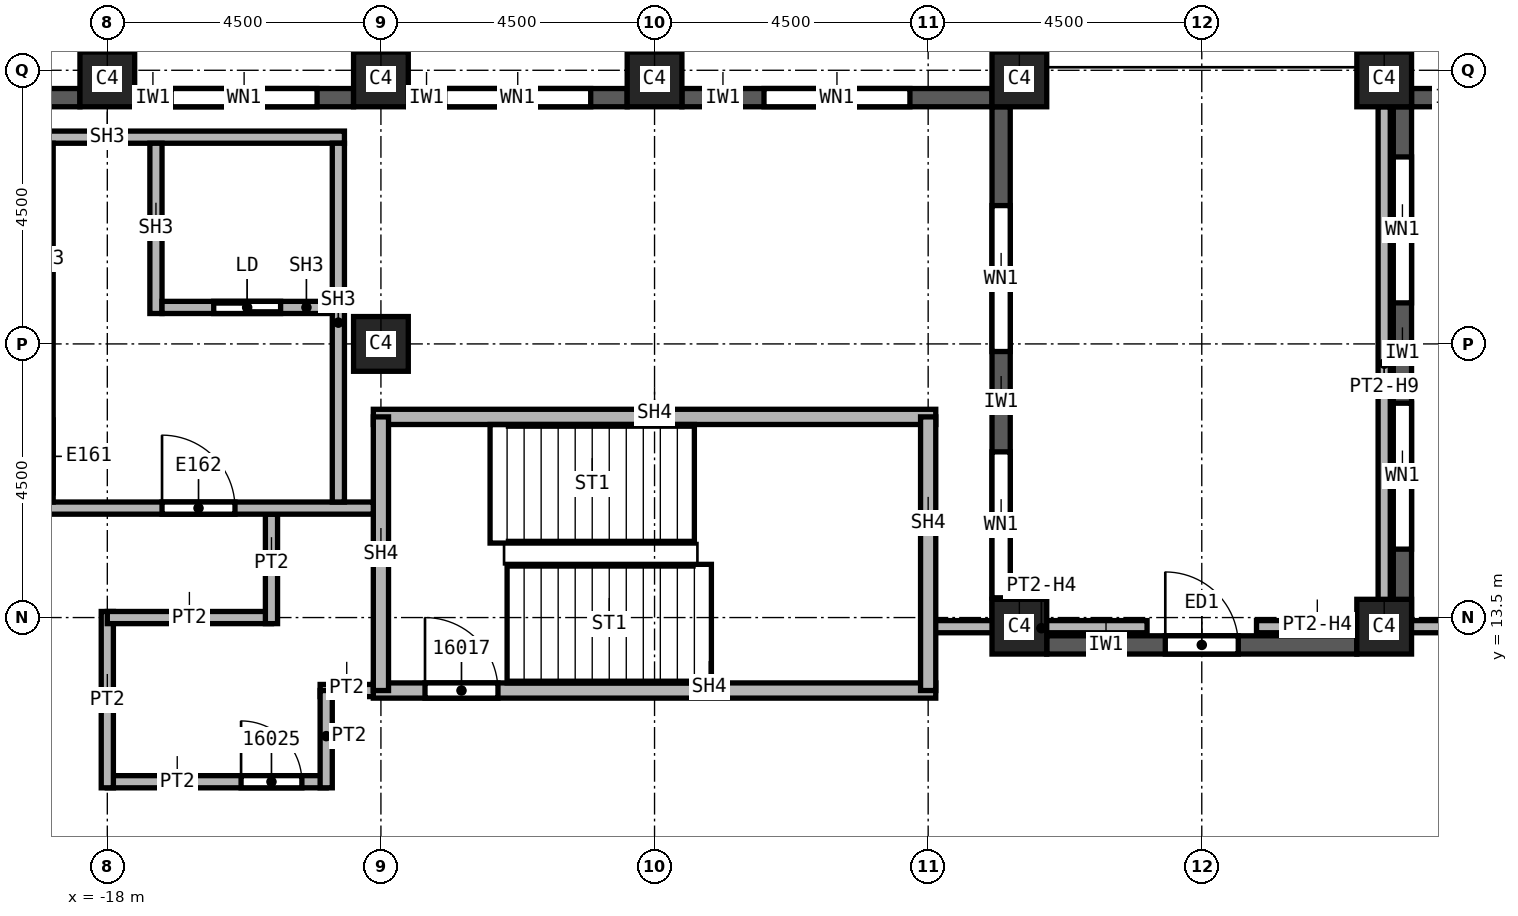
"""IFC4 building model, lengths in metres.
Left out: names, types, materials, properties, quantities, classifications, styles, units other than length and angle.
Written with IfcOpenShell. Run it as: python <this file> out.ifc"""

import sys

from ifc_helpers import new_model, si_unit, direction, frame, frame_2d, origin, origin_2d, place, context, subcontext, project, spatial, rectangle, extrude, element, fill, save


model = new_model("IFC4")
c1 = context("Model", 3, precision=1e-05, world=origin(), true_north=direction((0.0, 1.0)))
c2 = subcontext(c1, "Body", "Model", "MODEL_VIEW")
j1 = project(units=[si_unit("LENGTHUNIT", "METRE"), si_unit("PLANEANGLEUNIT", "RADIAN")], contexts=[c1])
p1 = place(None, origin())
s1 = spatial("IfcSite", under=j1, at=p1, CompositionType="ELEMENT")
p2 = place(p1, origin())
s2 = spatial("IfcBuilding", under=s1, at=p2, CompositionType="ELEMENT")
p3 = place(p2, frame((0.0, 0.0, 242.0)))
s3 = spatial("IfcBuildingStorey", under=s2, at=p3, CompositionType="ELEMENT", Elevation=242.0)
for number, where, z_axis, x_axis in (
    (1, (-13.5, 18.0, 0.0), (0.0, 0.0, 1.0), (1.0, 0.0, 0.0)),
    (2, (3.0, 22.35, 0.0), (0.0, 0.0, 1.0), (1.0, 0.0, 0.0)),
    (3, (-3.0, 22.35, 0.0), (0.0, 0.0, 1.0), (1.0, 0.0, 0.0)),
    (4, (-9.0, 22.35, 0.0), (0.0, 0.0, 1.0), (1.0, 0.0, 0.0)),
    (5, (-13.5, 22.35, 0.0), (0.0, 0.0, 1.0), (1.0, 0.0, 0.0)),
    (6, (-18.0, 22.35, 0.0), (0.0, 0.0, 1.0), (1.0, 0.0, 0.0)),
    (7, (3.0, 13.35, 0.0), (0.0, 0.0, 1.0), (1.0, 0.0, 0.0)),
    (8, (-3.0, 13.35, 0.0), (0.0, 0.0, 1.0), (1.0, 0.0, 0.0)),
):
    element("IfcColumn", number, at=place(p3, frame(where, z_axis=z_axis, x_axis=x_axis)), inside=s3, PredefinedType="COLUMN", context=c2, shape_type="SweptSolid", body=[
        extrude(rectangle(XDim=0.9, YDim=0.9, at=origin_2d()), origin(), (0.0, 0.0, 1.0), 3.72),
    ])
p4 = place(p3, frame((8.55, 22.05, 0.0), z_axis=(0.0, 0.0, 1.0), x_axis=(-1.0, 0.0, 0.0)))
e9 = element("IfcWall", 9, at=p4, inside=s3, PredefinedType="SOLIDWALL", context=c2, shape_type="SweptSolid", body=[
    extrude(rectangle(XDim=5.1, YDim=0.3, at=frame_2d((2.55, 0.0))), origin(), (0.0, 0.0, 1.0), 3.12),
])
p5 = place(p4, frame((1.35, 0.0, 0.8)))
e10 = element("IfcOpeningElement", 10, at=p5, cuts=e9, PredefinedType="OPENING", context=c2, shape_type="SweptSolid", body=[
    extrude(rectangle(XDim=2.4, YDim=1.95, at=frame_2d((1.2, 0.975))), frame((0.0, 0.15, 0.0), z_axis=(0.0, -1.0, 0.0), x_axis=(1.0, 0.0, 0.0)), (0.0, 0.0, 1.0), 0.3),
])
p6 = place(p3, frame((3.3, 21.9, 0.0), z_axis=(0.0, 0.0, 1.0), x_axis=(0.0, -1.0, 0.0)))
e11 = element("IfcWall", 11, at=p6, inside=s3, PredefinedType="SOLIDWALL", context=c2, shape_type="SweptSolid", body=[
    extrude(rectangle(XDim=8.5, YDim=0.3, at=frame_2d((4.25, 0.0))), origin(), (0.0, 0.0, 1.0), 3.12),
])
p7 = place(p6, frame((0.825, 0.0, 0.8)))
e12 = element("IfcOpeningElement", 12, at=p7, cuts=e11, PredefinedType="OPENING", context=c2, shape_type="SweptSolid", body=[
    extrude(rectangle(XDim=2.4, YDim=1.95, at=frame_2d((1.2, 0.975))), frame((0.0, 0.15, 0.0), z_axis=(0.0, -1.0, 0.0), x_axis=(1.0, 0.0, 0.0)), (0.0, 0.0, 1.0), 0.3),
])
p8 = place(p6, frame((4.875, 0.0, 0.8)))
e13 = element("IfcOpeningElement", 13, at=p8, cuts=e11, PredefinedType="OPENING", context=c2, shape_type="SweptSolid", body=[
    extrude(rectangle(XDim=2.4, YDim=1.95, at=frame_2d((1.2, 0.975))), frame((0.0, 0.15, 0.0), z_axis=(0.0, -1.0, 0.0), x_axis=(1.0, 0.0, 0.0)), (0.0, 0.0, 1.0), 0.3),
])
p9 = place(p3, frame((-2.55, 13.05, 0.0), z_axis=(0.0, 0.0, 1.0), x_axis=(1.0, 0.0, 0.0)))
e14 = element("IfcWall", 14, at=p9, inside=s3, PredefinedType="SOLIDWALL", context=c2, shape_type="SweptSolid", body=[
    extrude(rectangle(XDim=5.1, YDim=0.3, at=frame_2d((2.55, 0.0))), origin(), (0.0, 0.0, 1.0), 3.12),
])
p10 = place(p9, frame((1.95, 0.0, 0.0)))
e15 = element("IfcOpeningElement", 15, at=p10, cuts=e14, PredefinedType="OPENING", context=c2, shape_type="SweptSolid", body=[
    extrude(rectangle(XDim=1.2, YDim=2.4, at=frame_2d((0.6, 1.2))), frame((0.0, 0.15, 0.0), z_axis=(0.0, -1.0, 0.0), x_axis=(1.0, 0.0, 0.0)), (0.0, 0.0, 1.0), 0.3),
])
p11 = place(p3, frame((-3.3, 13.4, 0.0), z_axis=(0.0, 0.0, 1.0), x_axis=(0.0, 1.0, 0.0)))
e16 = element("IfcWall", 16, at=p11, inside=s3, PredefinedType="SOLIDWALL", context=c2, shape_type="SweptSolid", body=[
    extrude(rectangle(XDim=8.5, YDim=0.3, at=frame_2d((4.25, 0.0))), origin(), (0.0, 0.0, 1.0), 3.12),
])
p12 = place(p11, frame((0.425, 0.0, 0.8)))
e17 = element("IfcOpeningElement", 17, at=p12, cuts=e16, PredefinedType="OPENING", context=c2, shape_type="SweptSolid", body=[
    extrude(rectangle(XDim=2.4, YDim=1.95, at=frame_2d((1.2, 0.975))), frame((0.0, 0.15, 0.0), z_axis=(0.0, -1.0, 0.0), x_axis=(1.0, 0.0, 0.0)), (0.0, 0.0, 1.0), 0.3),
])
p13 = place(p11, frame((4.475, 0.0, 0.8)))
e18 = element("IfcOpeningElement", 18, at=p13, cuts=e16, PredefinedType="OPENING", context=c2, shape_type="SweptSolid", body=[
    extrude(rectangle(XDim=2.4, YDim=1.95, at=frame_2d((1.2, 0.975))), frame((0.0, 0.15, 0.0), z_axis=(0.0, -1.0, 0.0), x_axis=(1.0, 0.0, 0.0)), (0.0, 0.0, 1.0), 0.3),
])
p14 = place(p3, frame((-3.45, 22.05, 0.0), z_axis=(0.0, 0.0, 1.0), x_axis=(-1.0, 0.0, 0.0)))
e19 = element("IfcWall", 19, at=p14, inside=s3, PredefinedType="SOLIDWALL", context=c2, shape_type="SweptSolid", body=[
    extrude(rectangle(XDim=5.1, YDim=0.3, at=frame_2d((2.55, 0.0))), origin(), (0.0, 0.0, 1.0), 3.12),
])
p15 = place(p14, frame((1.35, 0.0, 0.8)))
e20 = element("IfcOpeningElement", 20, at=p15, cuts=e19, PredefinedType="OPENING", context=c2, shape_type="SweptSolid", body=[
    extrude(rectangle(XDim=2.4, YDim=1.95, at=frame_2d((1.2, 0.975))), frame((0.0, 0.15, 0.0), z_axis=(0.0, -1.0, 0.0), x_axis=(1.0, 0.0, 0.0)), (0.0, 0.0, 1.0), 0.3),
])
p16 = place(p3, frame((-9.45, 22.05, 0.0), z_axis=(0.0, 0.0, 1.0), x_axis=(-1.0, 0.0, 0.0)))
e21 = element("IfcWall", 21, at=p16, inside=s3, PredefinedType="SOLIDWALL", context=c2, shape_type="SweptSolid", body=[
    extrude(rectangle(XDim=3.6, YDim=0.3, at=frame_2d((1.8, 0.0))), origin(), (0.0, 0.0, 1.0), 3.12),
])
p17 = place(p16, frame((0.6, 0.0, 0.8)))
e22 = element("IfcOpeningElement", 22, at=p17, cuts=e21, PredefinedType="OPENING", context=c2, shape_type="SweptSolid", body=[
    extrude(rectangle(XDim=2.4, YDim=1.95, at=frame_2d((1.2, 0.975))), frame((0.0, 0.15, 0.0), z_axis=(0.0, -1.0, 0.0), x_axis=(1.0, 0.0, 0.0)), (0.0, 0.0, 1.0), 0.3),
])
p18 = place(p3, frame((-13.95, 22.05, 0.0), z_axis=(0.0, 0.0, 1.0), x_axis=(-1.0, 0.0, 0.0)))
e23 = element("IfcWall", 23, at=p18, inside=s3, PredefinedType="SOLIDWALL", context=c2, shape_type="SweptSolid", body=[
    extrude(rectangle(XDim=3.6, YDim=0.3, at=frame_2d((1.8, 0.0))), origin(), (0.0, 0.0, 1.0), 3.12),
])
p19 = place(p18, frame((0.6, 0.0, 0.8)))
e24 = element("IfcOpeningElement", 24, at=p19, cuts=e23, PredefinedType="OPENING", context=c2, shape_type="SweptSolid", body=[
    extrude(rectangle(XDim=2.4, YDim=1.95, at=frame_2d((1.2, 0.975))), frame((0.0, 0.15, 0.0), z_axis=(0.0, -1.0, 0.0), x_axis=(1.0, 0.0, 0.0)), (0.0, 0.0, 1.0), 0.3),
])
p20 = place(p3, frame((-18.45, 22.05, 0.0), z_axis=(0.0, 0.0, 1.0), x_axis=(-1.0, 0.0, 0.0)))
e25 = element("IfcWall", 25, at=p20, inside=s3, PredefinedType="SOLIDWALL", context=c2, shape_type="SweptSolid", body=[
    extrude(rectangle(XDim=3.6, YDim=0.3, at=frame_2d((1.8, 0.0))), origin(), (0.0, 0.0, 1.0), 3.12),
])
p21 = place(p20, frame((0.6, 0.0, 0.8)))
e26 = element("IfcOpeningElement", 26, at=p21, cuts=e25, PredefinedType="OPENING", context=c2, shape_type="SweptSolid", body=[
    extrude(rectangle(XDim=2.4, YDim=1.95, at=frame_2d((1.2, 0.975))), frame((0.0, 0.15, 0.0), z_axis=(0.0, -1.0, 0.0), x_axis=(1.0, 0.0, 0.0)), (0.0, 0.0, 1.0), 0.3),
])
p22 = place(p3, frame((-18.0, 10.8, 0.0), z_axis=(0.0, 0.0, 1.0), x_axis=(1.0, 0.0, 0.0)))
e27 = element("IfcWall", 27, at=p22, inside=s3, PredefinedType="PARTITIONING", context=c2, shape_type="SweptSolid", body=[
    extrude(rectangle(XDim=3.6, YDim=0.2, at=frame_2d((1.8, 0.0))), origin(), (0.0, 0.0, 1.0), 3.72),
])
p23 = place(p22, frame((2.2, 0.0, 0.0)))
e28 = element("IfcOpeningElement", 28, at=p23, cuts=e27, PredefinedType="OPENING", context=c2, shape_type="SweptSolid", body=[
    extrude(rectangle(XDim=1.0, YDim=2.1, at=frame_2d((0.5, 1.05))), frame((0.0, 0.1, 0.0), z_axis=(0.0, -1.0, 0.0), x_axis=(1.0, 0.0, 0.0)), (0.0, 0.0, 1.0), 0.2),
])
p24 = place(p3, frame((-18.0, 13.6, 0.0), z_axis=(0.0, 0.0, 1.0), x_axis=(0.0, -1.0, 0.0)))
e29 = element("IfcWall", 29, at=p24, inside=s3, PredefinedType="PARTITIONING", context=c2, shape_type="SweptSolid", body=[
    extrude(rectangle(XDim=2.9, YDim=0.2, at=frame_2d((1.45, 0.0))), origin(), (0.0, 0.0, 1.0), 3.72),
])
p25 = place(p3, frame((-15.3, 13.5, 0.0), z_axis=(0.0, 0.0, 1.0), x_axis=(-1.0, 0.0, 0.0)))
e30 = element("IfcWall", 30, at=p25, inside=s3, PredefinedType="PARTITIONING", context=c2, shape_type="SweptSolid", body=[
    extrude(rectangle(XDim=2.7, YDim=0.2, at=frame_2d((1.35, 0.0))), origin(), (0.0, 0.0, 1.0), 3.72),
])
p26 = place(p3, frame((-15.3, 15.2, 0.0), z_axis=(0.0, 0.0, 1.0), x_axis=(0.0, -1.0, 0.0)))
e31 = element("IfcWall", 31, at=p26, inside=s3, PredefinedType="PARTITIONING", context=c2, shape_type="SweptSolid", body=[
    extrude(rectangle(XDim=1.8, YDim=0.2, at=frame_2d((0.9, 0.0))), origin(), (0.0, 0.0, 1.0), 3.72),
])
p27 = place(p3, frame((-14.5, 12.3, 0.0), z_axis=(0.0, 0.0, 1.0), x_axis=(1.0, 0.0, 0.0)))
e32 = element("IfcWall", 32, at=p27, inside=s3, PredefinedType="PARTITIONING", context=c2, shape_type="SweptSolid", body=[
    extrude(rectangle(XDim=1.125, YDim=0.2, at=frame_2d((0.562, 0.0))), origin(), (0.0, 0.0, 1.0), 3.72),
])
p28 = place(p3, frame((-14.4, 10.7, 0.0), z_axis=(0.0, 0.0, 1.0), x_axis=(0.0, 1.0, 0.0)))
e33 = element("IfcWall", 33, at=p28, inside=s3, PredefinedType="PARTITIONING", context=c2, shape_type="SweptSolid", body=[
    extrude(rectangle(XDim=1.6, YDim=0.2, at=frame_2d((0.8, 0.0))), origin(), (0.0, 0.0, 1.0), 3.72),
])
for number, where, z_axis, x_axis in (
    (34, (-4.5, 13.35, 0.0), (0.0, 0.0, 1.0), (1.0, 0.0, 0.0)),
    (35, (0.9, 13.35, 0.0), (0.0, 0.0, 1.0), (1.0, 0.0, 0.0)),
):
    element("IfcWall", number, at=place(p3, frame(where, z_axis=z_axis, x_axis=x_axis)), inside=s3, PredefinedType="PARTITIONING", context=c2, shape_type="SweptSolid", body=[
        extrude(rectangle(XDim=3.6, YDim=0.2, at=frame_2d((1.8, 0.0))), origin(), (0.0, 0.0, 1.0), 3.118),
    ])
p29 = place(p3, frame((3.0, 21.9, 0.0), z_axis=(0.0, 0.0, 1.0), x_axis=(0.0, -1.0, 0.0)))
e36 = element("IfcWall", 36, at=p29, inside=s3, PredefinedType="PARTITIONING", context=c2, shape_type="SweptSolid", body=[
    extrude(rectangle(XDim=8.55, YDim=0.2, at=frame_2d((4.275, 0.0))), origin(), (0.0, 0.0, 1.0), 2.874),
])
p30 = place(p3, frame((-13.625, 12.3, 0.0), z_axis=(0.0, 0.0, 1.0), x_axis=(1.0, 0.0, 0.0)))
e37 = element("IfcWall", 37, at=p30, inside=s3, PredefinedType="SOLIDWALL", context=c2, shape_type="SweptSolid", body=[
    extrude(rectangle(XDim=9.25, YDim=0.25, at=frame_2d((4.625, 0.0))), origin(), (0.0, 0.0, 1.0), 3.72),
])
p31 = place(p30, frame((0.85, 0.0, 0.0)))
e38 = element("IfcOpeningElement", 38, at=p31, cuts=e37, PredefinedType="OPENING", context=c2, shape_type="SweptSolid", body=[
    extrude(rectangle(XDim=1.2, YDim=2.1, at=frame_2d((0.6, 1.05))), frame((0.0, 0.125, 0.0), z_axis=(0.0, -1.0, 0.0), x_axis=(1.0, 0.0, 0.0)), (0.0, 0.0, 1.0), 0.25),
])
p32 = place(p3, frame((-13.625, 16.8, 0.0), z_axis=(0.0, 0.0, 1.0), x_axis=(1.0, 0.0, 0.0)))
e39 = element("IfcWall", 39, at=p32, inside=s3, PredefinedType="SOLIDWALL", context=c2, shape_type="SweptSolid", body=[
    extrude(rectangle(XDim=9.25, YDim=0.25, at=frame_2d((4.625, 0.0))), origin(), (0.0, 0.0, 1.0), 3.72),
])
for number, where, z_axis, x_axis in (
    (40, (-13.5, 12.3, 0.0), (0.0, 0.0, 1.0), (0.0, 1.0, 0.0)),
    (41, (-4.5, 16.8, 0.0), (0.0, 0.0, 1.0), (0.0, -1.0, 0.0)),
):
    element("IfcWall", number, at=place(p3, frame(where, z_axis=z_axis, x_axis=x_axis)), inside=s3, PredefinedType="SOLIDWALL", context=c2, shape_type="SweptSolid", body=[
        extrude(rectangle(XDim=4.5, YDim=0.25, at=frame_2d((2.25, 0.0))), origin(), (0.0, 0.0, 1.0), 3.72),
    ])
p33 = place(p3, frame((-21.9, 15.3, 0.0), z_axis=(0.0, 0.0, 1.0), x_axis=(1.0, 0.0, 0.0)))
e42 = element("IfcWall", 42, at=p33, inside=s3, PredefinedType="SOLIDWALL", context=c2, shape_type="SweptSolid", body=[
    extrude(rectangle(XDim=8.275, YDim=0.2, at=frame_2d((4.137, 0.0))), origin(), (0.0, 0.0, 1.0), 3.72),
])
p34 = place(p33, frame((4.8, 0.0, 0.0)))
e43 = element("IfcOpeningElement", 43, at=p34, cuts=e42, PredefinedType="OPENING", context=c2, shape_type="SweptSolid", body=[
    extrude(rectangle(XDim=1.2, YDim=2.1, at=frame_2d((0.6, 1.05))), frame((0.0, 0.1, 0.0), z_axis=(0.0, -1.0, 0.0), x_axis=(1.0, 0.0, 0.0)), (0.0, 0.0, 1.0), 0.2),
])
p35 = place(p3, frame((-21.9, 21.4, 0.0), z_axis=(0.0, 0.0, 1.0), x_axis=(1.0, 0.0, 0.0)))
e44 = element("IfcWall", 44, at=p35, inside=s3, PredefinedType="SOLIDWALL", context=c2, shape_type="SweptSolid", body=[
    extrude(rectangle(XDim=7.8, YDim=0.2, at=frame_2d((3.9, 0.0))), origin(), (0.0, 0.0, 1.0), 3.72),
])
p36 = place(p3, frame((-14.2, 15.4, 0.0), z_axis=(0.0, 0.0, 1.0), x_axis=(0.0, 1.0, 0.0)))
e45 = element("IfcWall", 45, at=p36, inside=s3, PredefinedType="SOLIDWALL", context=c2, shape_type="SweptSolid", body=[
    extrude(rectangle(XDim=5.9, YDim=0.2, at=frame_2d((2.95, 0.0))), origin(), (0.0, 0.0, 1.0), 3.72),
])
p37 = place(p3, frame((-18.99, 15.4, 0.0), z_axis=(0.0, 0.0, 1.0), x_axis=(0.0, 1.0, 0.0)))
e46 = element("IfcWall", 46, at=p37, inside=s3, PredefinedType="SOLIDWALL", context=c2, shape_type="SweptSolid", body=[
    extrude(rectangle(XDim=5.9, YDim=0.2, at=frame_2d((2.95, 0.0))), origin(), (0.0, 0.0, 1.0), 3.72),
])
p38 = place(p37, frame((0.15, 0.0, 0.0)))
e47 = element("IfcOpeningElement", 47, at=p38, cuts=e46, PredefinedType="OPENING", context=c2, shape_type="SweptSolid", body=[
    extrude(rectangle(XDim=1.2, YDim=2.1, at=frame_2d((0.6, 1.05))), frame((0.0, 0.1, 0.0), z_axis=(0.0, -1.0, 0.0), x_axis=(1.0, 0.0, 0.0)), (0.0, 0.0, 1.0), 0.2),
])
p39 = place(p3, frame((-17.2, 18.5, 0.0), z_axis=(0.0, 0.0, 1.0), x_axis=(0.0, 1.0, 0.0)))
e48 = element("IfcWall", 48, at=p39, inside=s3, PredefinedType="SOLIDWALL", context=c2, shape_type="SweptSolid", body=[
    extrude(rectangle(XDim=2.8, YDim=0.2, at=frame_2d((1.4, 0.0))), origin(), (0.0, 0.0, 1.0), 3.72),
])
p40 = place(p3, frame((-17.1, 18.6, 0.0), z_axis=(0.0, 0.0, 1.0), x_axis=(1.0, 0.0, 0.0)))
e49 = element("IfcWall", 49, at=p40, inside=s3, PredefinedType="SOLIDWALL", context=c2, shape_type="SweptSolid", body=[
    extrude(rectangle(XDim=2.8, YDim=0.2, at=frame_2d((1.4, 0.0))), origin(), (0.0, 0.0, 1.0), 3.72),
])
p41 = place(p40, frame((0.85, 0.0, 0.0)))
e50 = element("IfcOpeningElement", 50, at=p41, cuts=e49, PredefinedType="OPENING", context=c2, shape_type="SweptSolid", body=[
    extrude(rectangle(XDim=1.1, YDim=2.1, at=frame_2d((0.55, 1.05))), frame((0.0, 0.1, 0.0), z_axis=(0.0, -1.0, 0.0), x_axis=(1.0, 0.0, 0.0)), (0.0, 0.0, 1.0), 0.2),
])
p42 = place(p7, origin())
e51 = element("IfcWindow", 51, at=p42, inside=s3, PartitioningType="SINGLE_PANEL", PredefinedType="WINDOW", context=c2, shape_type="SweptSolid", body=[
    extrude(rectangle(XDim=2.4, YDim=1.95, at=frame_2d((1.2, 0.975))), frame((0.0, 0.03, 0.0), z_axis=(0.0, -1.0, 0.0), x_axis=(1.0, 0.0, 0.0)), (0.0, 0.0, 1.0), 0.06),
])
fill(e12, e51)
p43 = place(p8, origin())
e52 = element("IfcWindow", 52, at=p43, inside=s3, PartitioningType="SINGLE_PANEL", PredefinedType="WINDOW", context=c2, shape_type="SweptSolid", body=[
    extrude(rectangle(XDim=2.4, YDim=1.95, at=frame_2d((1.2, 0.975))), frame((0.0, 0.03, 0.0), z_axis=(0.0, -1.0, 0.0), x_axis=(1.0, 0.0, 0.0)), (0.0, 0.0, 1.0), 0.06),
])
fill(e13, e52)
p44 = place(p10, origin())
e53 = element("IfcDoor", 53, at=p44, inside=s3, OperationType="SINGLE_SWING_LEFT", PredefinedType="DOOR", context=c2, shape_type="SweptSolid", body=[
    extrude(rectangle(XDim=1.2, YDim=2.4, at=frame_2d((0.6, 1.2))), frame((0.0, 0.025, 0.0), z_axis=(0.0, -1.0, 0.0), x_axis=(1.0, 0.0, 0.0)), (0.0, 0.0, 1.0), 0.05),
])
fill(e15, e53)
p45 = place(p12, origin())
e54 = element("IfcWindow", 54, at=p45, inside=s3, PartitioningType="SINGLE_PANEL", PredefinedType="WINDOW", context=c2, shape_type="SweptSolid", body=[
    extrude(rectangle(XDim=2.4, YDim=1.95, at=frame_2d((1.2, 0.975))), frame((0.0, 0.03, 0.0), z_axis=(0.0, -1.0, 0.0), x_axis=(1.0, 0.0, 0.0)), (0.0, 0.0, 1.0), 0.06),
])
fill(e17, e54)
p46 = place(p13, origin())
e55 = element("IfcWindow", 55, at=p46, inside=s3, PartitioningType="SINGLE_PANEL", PredefinedType="WINDOW", context=c2, shape_type="SweptSolid", body=[
    extrude(rectangle(XDim=2.4, YDim=1.95, at=frame_2d((1.2, 0.975))), frame((0.0, 0.03, 0.0), z_axis=(0.0, -1.0, 0.0), x_axis=(1.0, 0.0, 0.0)), (0.0, 0.0, 1.0), 0.06),
])
fill(e18, e55)
p47 = place(p15, origin())
e56 = element("IfcWindow", 56, at=p47, inside=s3, PartitioningType="SINGLE_PANEL", PredefinedType="WINDOW", context=c2, shape_type="SweptSolid", body=[
    extrude(rectangle(XDim=2.4, YDim=1.95, at=frame_2d((1.2, 0.975))), frame((0.0, 0.03, 0.0), z_axis=(0.0, -1.0, 0.0), x_axis=(1.0, 0.0, 0.0)), (0.0, 0.0, 1.0), 0.06),
])
fill(e20, e56)
p48 = place(p17, origin())
e57 = element("IfcWindow", 57, at=p48, inside=s3, PartitioningType="SINGLE_PANEL", PredefinedType="WINDOW", context=c2, shape_type="SweptSolid", body=[
    extrude(rectangle(XDim=2.4, YDim=1.95, at=frame_2d((1.2, 0.975))), frame((0.0, 0.03, 0.0), z_axis=(0.0, -1.0, 0.0), x_axis=(1.0, 0.0, 0.0)), (0.0, 0.0, 1.0), 0.06),
])
fill(e22, e57)
p49 = place(p19, origin())
e58 = element("IfcWindow", 58, at=p49, inside=s3, PartitioningType="SINGLE_PANEL", PredefinedType="WINDOW", context=c2, shape_type="SweptSolid", body=[
    extrude(rectangle(XDim=2.4, YDim=1.95, at=frame_2d((1.2, 0.975))), frame((0.0, 0.03, 0.0), z_axis=(0.0, -1.0, 0.0), x_axis=(1.0, 0.0, 0.0)), (0.0, 0.0, 1.0), 0.06),
])
fill(e24, e58)
p50 = place(p31, origin())
e59 = element("IfcDoor", 59, at=p50, inside=s3, OperationType="SINGLE_SWING_RIGHT", PredefinedType="DOOR", context=c2, shape_type="SweptSolid", body=[
    extrude(rectangle(XDim=1.2, YDim=2.1, at=frame_2d((0.6, 1.05))), frame((0.0, 0.025, 0.0), z_axis=(0.0, -1.0, 0.0), x_axis=(1.0, 0.0, 0.0)), (0.0, 0.0, 1.0), 0.05),
])
fill(e38, e59)
p51 = place(p23, origin())
e60 = element("IfcDoor", 60, at=p51, inside=s3, OperationType="SINGLE_SWING_RIGHT", PredefinedType="DOOR", context=c2, shape_type="SweptSolid", body=[
    extrude(rectangle(XDim=1.0, YDim=2.1, at=frame_2d((0.5, 1.05))), frame((0.0, 0.025, 0.0), z_axis=(0.0, -1.0, 0.0), x_axis=(1.0, 0.0, 0.0)), (0.0, 0.0, 1.0), 0.05),
])
fill(e28, e60)
p52 = place(p41, origin())
e61 = element("IfcDoor", 61, at=p52, inside=s3, OperationType="SLIDING_TO_LEFT", PredefinedType="DOOR", context=c2, shape_type="SweptSolid", body=[
    extrude(rectangle(XDim=1.1, YDim=2.1, at=frame_2d((0.55, 1.05))), frame((0.0, 0.025, 0.0), z_axis=(0.0, -1.0, 0.0), x_axis=(1.0, 0.0, 0.0)), (0.0, 0.0, 1.0), 0.05),
])
fill(e50, e61)
p53 = place(p34, origin())
e62 = element("IfcDoor", 62, at=p53, inside=s3, OperationType="SINGLE_SWING_RIGHT", PredefinedType="DOOR", context=c2, shape_type="SweptSolid", body=[
    extrude(rectangle(XDim=1.2, YDim=2.1, at=frame_2d((0.6, 1.05))), frame((0.0, 0.025, 0.0), z_axis=(0.0, -1.0, 0.0), x_axis=(1.0, 0.0, 0.0)), (0.0, 0.0, 1.0), 0.05),
])
fill(e43, e62)
save(model, sys.argv[1])
